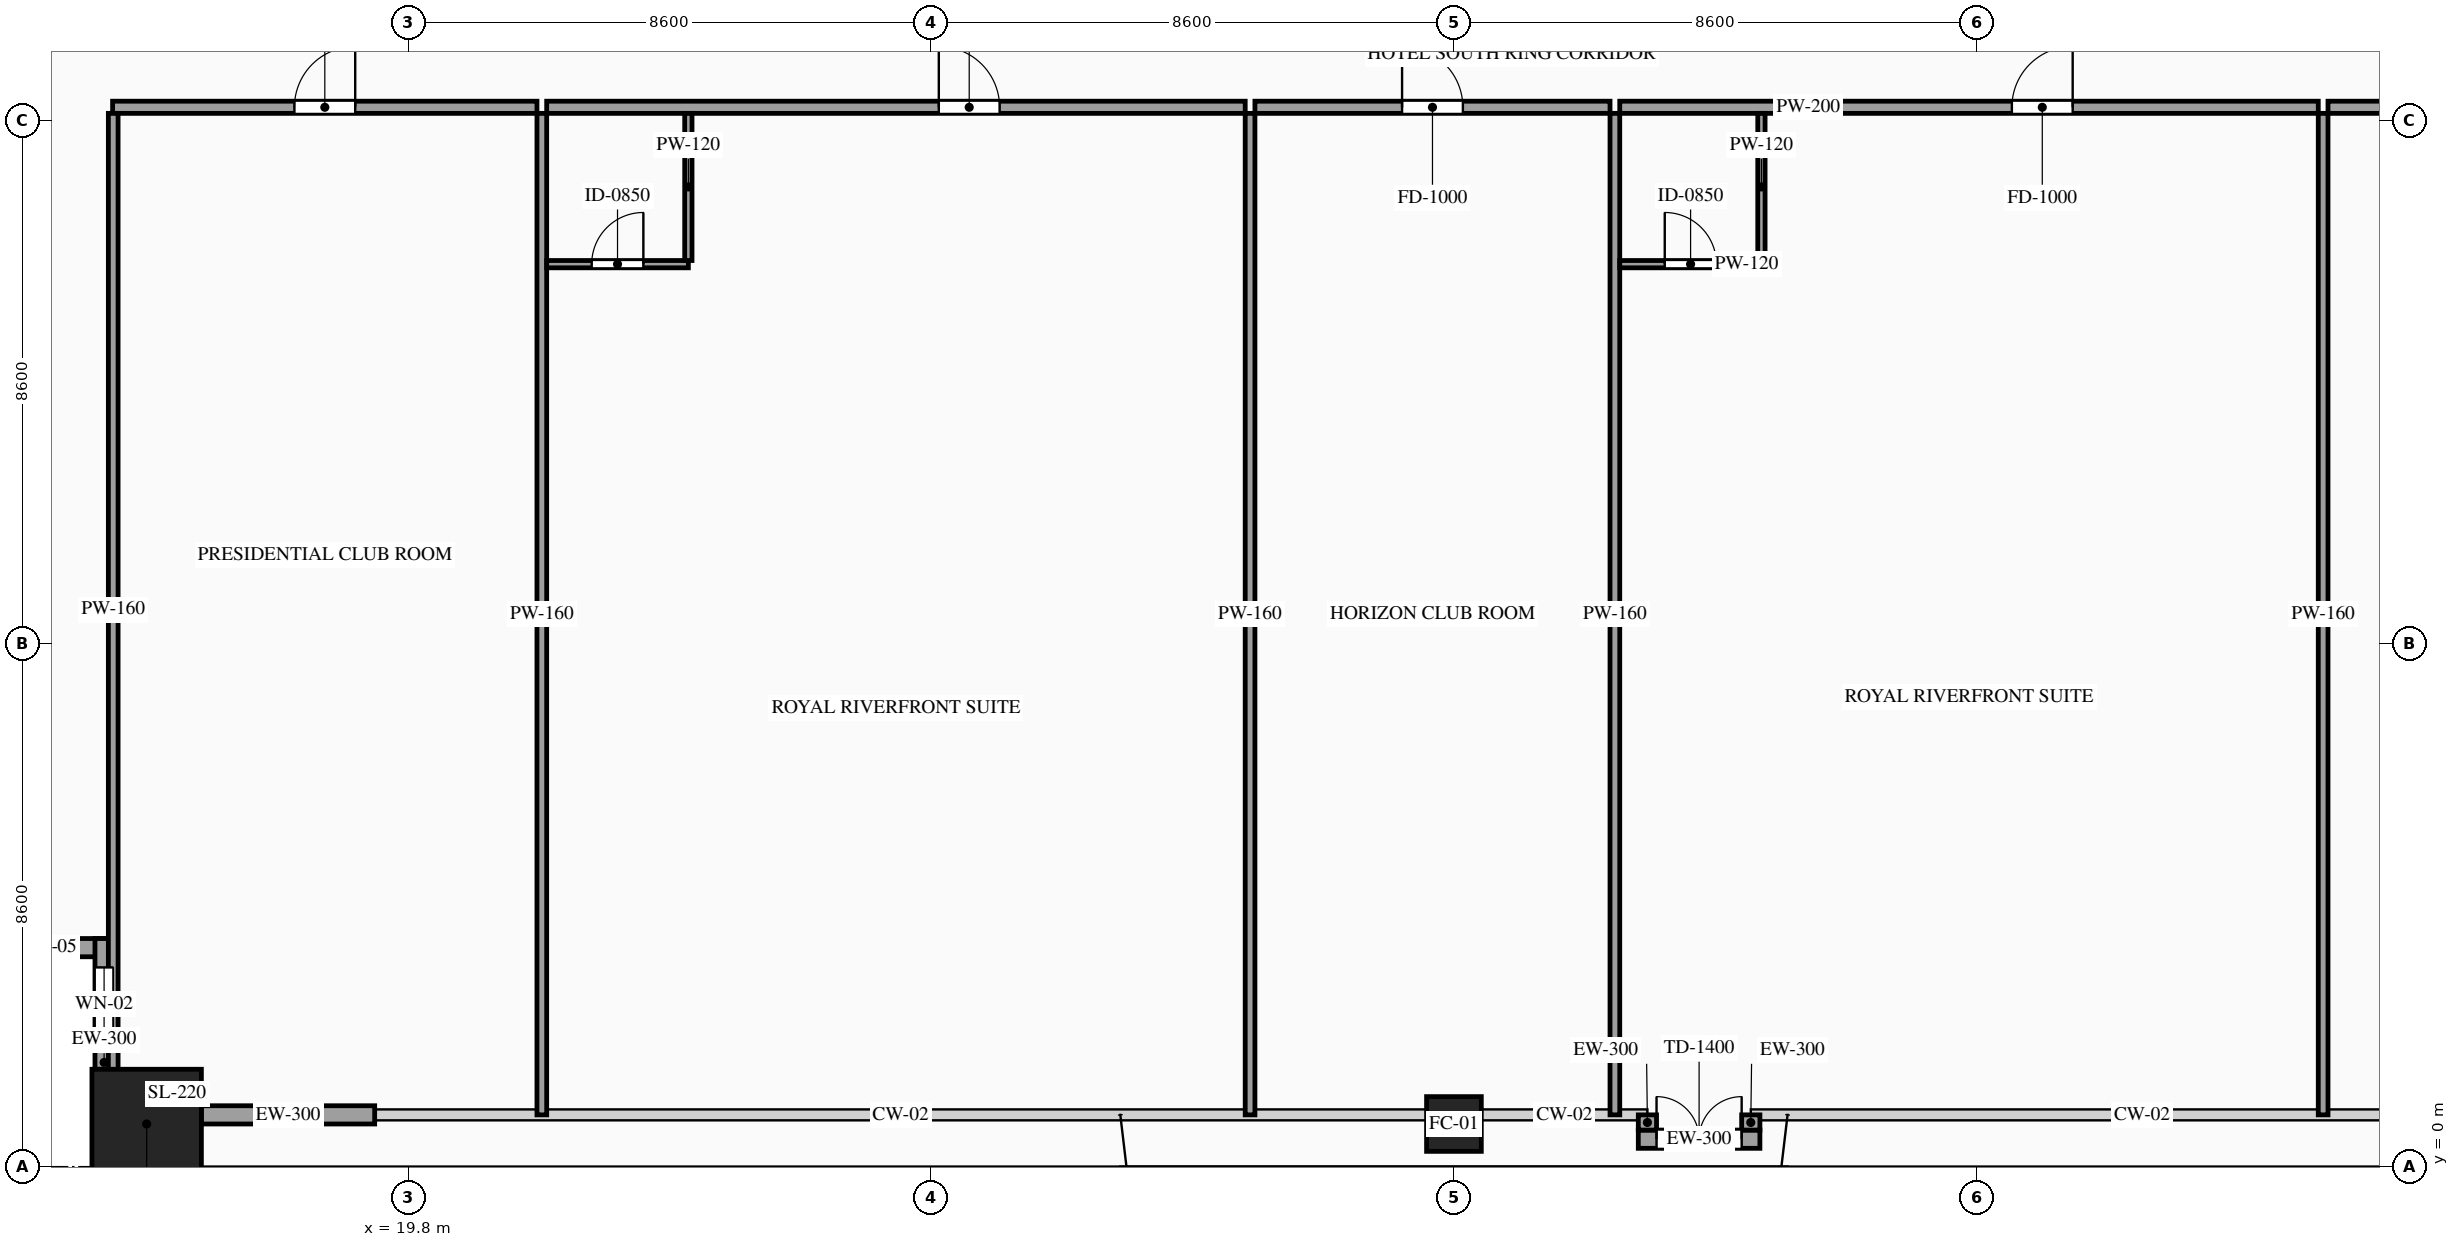
"""IFC4 building model, lengths in metres.
Left out: names, types, materials, properties, quantities, classifications, styles, units other than length and angle.
Written with IfcOpenShell. Run it as: python <this file> out.ifc"""

import sys

from ifc_helpers import new_model, si_unit, direction, frame, frame_2d, origin, origin_2d, place, context, subcontext, project, spatial, rectangle, hollow_rectangle, extrude, source, transform, mapped, element, fill, save


model = new_model("IFC4")
c1 = context("Model", 3, precision=1e-05, world=origin(), true_north=direction((0.0, 1.0)))
c2 = subcontext(c1, "Body", "Model", "MODEL_VIEW")
j1 = project(units=[si_unit("LENGTHUNIT", "METRE"), si_unit("PLANEANGLEUNIT", "RADIAN")], contexts=[c1])
p1 = place(None, origin())
s1 = spatial("IfcSite", under=j1, at=p1, CompositionType="ELEMENT")
p2 = place(p1, origin())
s2 = spatial("IfcBuilding", under=s1, at=p2, CompositionType="ELEMENT")
p3 = place(p2, frame((0.0, 0.0, 78.4)))
s3 = spatial("IfcBuildingStorey", under=s2, at=p3, CompositionType="ELEMENT", Elevation=78.4)
m1 = source(origin(), c2, "Body", "SweptSolid", [
    extrude(hollow_rectangle(XDim=1.8, YDim=1.8, WallThickness=0.08, at=origin_2d()), origin(), (0.0, 0.0, 1.0), 3.6),
])
p4 = place(p3, frame((15.5, 0.7, 0.0), z_axis=(0.0, 0.0, 1.0), x_axis=(1.0, 0.0, 0.0)))
e1 = element("IfcColumn", 1, at=p4, inside=s3, PredefinedType="COLUMN", context=c2, shape_type="MappedRepresentation", body=[
    mapped(m1, transform((0.0, 0.0, 0.0), scale=1.0)),
])
m2 = source(origin(), c2, "Body", "SweptSolid", [
    extrude(hollow_rectangle(XDim=0.9, YDim=0.9, WallThickness=0.042, at=origin_2d()), origin(), (0.0, 0.0, 1.0), 3.6),
])
p5 = place(p3, frame((37.0, 0.7, 0.0), z_axis=(0.0, 0.0, 1.0), x_axis=(1.0, 0.0, 0.0)))
e2 = element("IfcColumn", 2, at=p5, inside=s3, PredefinedType="COLUMN", context=c2, shape_type="MappedRepresentation", body=[
    mapped(m2, transform((0.0, 0.0, 0.0), scale=1.0)),
])
p6 = place(p3, frame((12.8, 3.6, 0.0), z_axis=(0.0, 0.0, 1.0), x_axis=(1.0, 0.0, 0.0)))
e3 = element("IfcWall", 3, at=p6, inside=s3, PredefinedType="SOLIDWALL", context=c2, shape_type="SweptSolid", body=[
    extrude(rectangle(XDim=2.15, YDim=0.3, at=frame_2d((1.075, 0.0))), origin(), (0.0, 0.0, 1.0), 3.38),
])
p7 = place(p6, frame((0.625, 0.0, 0.85)))
e4 = element("IfcOpeningElement", 4, at=p7, cuts=e3, PredefinedType="OPENING", context=c2, shape_type="SweptSolid", body=[
    extrude(rectangle(XDim=0.9, YDim=1.5, at=frame_2d((0.45, 0.75))), frame((0.0, 0.165, 0.0), z_axis=(0.0, -1.0, 0.0), x_axis=(1.0, 0.0, 0.0)), (0.0, 0.0, 1.0), 0.33),
])
p8 = place(p3, frame((14.8, 3.75, 0.0), z_axis=(0.0, 0.0, 1.0), x_axis=(0.0, -1.0, 0.0)))
e5 = element("IfcWall", 5, at=p8, inside=s3, PredefinedType="SOLIDWALL", context=c2, shape_type="SweptSolid", body=[
    extrude(rectangle(XDim=2.15, YDim=0.3, at=frame_2d((1.075, 0.0))), origin(), (0.0, 0.0, 1.0), 3.38),
])
p9 = place(p8, frame((0.475, 0.0, 0.85)))
e6 = element("IfcOpeningElement", 6, at=p9, cuts=e5, PredefinedType="OPENING", context=c2, shape_type="SweptSolid", body=[
    extrude(rectangle(XDim=1.2, YDim=2.1, at=frame_2d((0.6, 1.05))), frame((0.0, 0.165, 0.0), z_axis=(0.0, -1.0, 0.0), x_axis=(1.0, 0.0, 0.0)), (0.0, 0.0, 1.0), 0.33),
])
m3 = source(origin(), c2, "Body", "SweptSolid", [
    extrude(rectangle(XDim=2.85, YDim=0.3, at=frame_2d((1.425, 0.0))), origin(), (0.0, 0.0, 1.0), 2.775),
])
p10 = place(p3, frame((16.4, 0.85, 0.0), z_axis=(0.0, 0.0, 1.0), x_axis=(1.0, 0.0, 0.0)))
e7 = element("IfcWall", 7, at=p10, inside=s3, PredefinedType="SOLIDWALL", context=c2, shape_type="MappedRepresentation", body=[
    mapped(m3, transform((0.0, 0.0, 0.0), scale=1.0)),
])
p11 = place(p3, frame((40.032, 0.45, 0.0), z_axis=(0.0, 0.0, 1.0), x_axis=(1.0, 0.0, 0.0)))
e8 = element("IfcWall", 8, at=p11, inside=s3, PredefinedType="SOLIDWALL", context=c2, shape_type="SweptSolid", body=[
    extrude(rectangle(XDim=2.0, YDim=0.3, at=frame_2d((1.0, 0.0))), origin(), (0.0, 0.0, 1.0), 3.38),
])
p12 = place(p11, frame((0.3, 0.0, 0.0)))
e9 = element("IfcOpeningElement", 9, at=p12, cuts=e8, PredefinedType="OPENING", context=c2, shape_type="SweptSolid", body=[
    extrude(rectangle(XDim=1.4, YDim=2.3, at=frame_2d((0.7, 1.15))), frame((0.0, 0.165, 0.0), z_axis=(0.0, -1.0, 0.0), x_axis=(1.0, 0.0, 0.0)), (0.0, 0.0, 1.0), 0.33),
])
m4 = source(origin(), c2, "Body", "SweptSolid", [
    extrude(rectangle(XDim=0.25, YDim=0.3, at=frame_2d((0.125, 0.0))), origin(), (0.0, 0.0, 1.0), 3.38),
])
for number, where, z_axis, x_axis in (
    (10, (40.182, 0.85, 0.0), (0.0, 0.0, 1.0), (0.0, -1.0, 0.0)),
    (11, (41.882, 0.6, 0.0), (0.0, 0.0, 1.0), (0.0, 1.0, 0.0)),
):
    element("IfcWall", number, at=place(p3, frame(where, z_axis=z_axis, x_axis=x_axis)), inside=s3, PredefinedType="SOLIDWALL", context=c2, shape_type="MappedRepresentation", body=[
        mapped(m4, transform((0.0, 0.0, 0.0), scale=1.0)),
    ])
p13 = place(p3, frame((14.94, 17.42, 0.0), z_axis=(0.0, 0.0, 1.0), x_axis=(1.0, 0.0, 0.0)))
e12 = element("IfcWall", 12, at=p13, inside=s3, PredefinedType="PARTITIONING", context=c2, shape_type="SweptSolid", body=[
    extrude(rectangle(XDim=6.979, YDim=0.2, at=frame_2d((3.49, 0.0))), origin(), (0.0, 0.0, 1.0), 3.38),
])
p14 = place(p13, frame((2.99, 0.0, 0.0)))
e13 = element("IfcOpeningElement", 13, at=p14, cuts=e12, PredefinedType="OPENING", context=c2, shape_type="SweptSolid", body=[
    extrude(rectangle(XDim=1.0, YDim=2.2, at=frame_2d((0.5, 1.1))), frame((0.0, 0.115, 0.0), z_axis=(0.0, -1.0, 0.0), x_axis=(1.0, 0.0, 0.0)), (0.0, 0.0, 1.0), 0.23),
])
m5 = source(origin(), c2, "Body", "SweptSolid", [
    extrude(rectangle(XDim=16.47, YDim=0.16, at=frame_2d((8.235, 0.0))), origin(), (0.0, 0.0, 1.0), 3.38),
])
p15 = place(p3, frame((21.999, 0.85, 0.0), z_axis=(0.0, 0.0, 1.0), x_axis=(0.0, 1.0, 0.0)))
e14 = element("IfcWall", 14, at=p15, inside=s3, PredefinedType="PARTITIONING", context=c2, shape_type="MappedRepresentation", body=[
    mapped(m5, transform((0.0, 0.0, 0.0), scale=1.0)),
])
p16 = place(p3, frame((22.079, 17.42, 0.0), z_axis=(0.0, 0.0, 1.0), x_axis=(1.0, 0.0, 0.0)))
e15 = element("IfcWall", 15, at=p16, inside=s3, PredefinedType="PARTITIONING", context=c2, shape_type="SweptSolid", body=[
    extrude(rectangle(XDim=11.488, YDim=0.2, at=frame_2d((5.744, 0.0))), origin(), (0.0, 0.0, 1.0), 3.38),
])
p17 = place(p16, frame((6.449, 0.0, 0.0)))
e16 = element("IfcOpeningElement", 16, at=p17, cuts=e15, PredefinedType="OPENING", context=c2, shape_type="SweptSolid", body=[
    extrude(rectangle(XDim=1.0, YDim=2.2, at=frame_2d((0.5, 1.1))), frame((0.0, 0.115, 0.0), z_axis=(0.0, -1.0, 0.0), x_axis=(1.0, 0.0, 0.0)), (0.0, 0.0, 1.0), 0.23),
])
p18 = place(p3, frame((33.647, 0.85, 0.0), z_axis=(0.0, 0.0, 1.0), x_axis=(0.0, 1.0, 0.0)))
e17 = element("IfcWall", 17, at=p18, inside=s3, PredefinedType="PARTITIONING", context=c2, shape_type="MappedRepresentation", body=[
    mapped(m5, transform((0.0, 0.0, 0.0), scale=1.0)),
])
p19 = place(p3, frame((22.079, 14.84, 0.0), z_axis=(0.0, 0.0, 1.0), x_axis=(1.0, 0.0, 0.0)))
e18 = element("IfcWall", 18, at=p19, inside=s3, PredefinedType="PARTITIONING", context=c2, shape_type="SweptSolid", body=[
    extrude(rectangle(XDim=2.33, YDim=0.12, at=frame_2d((1.165, 0.0))), origin(), (0.0, 0.0, 1.0), 3.38),
])
p20 = place(p19, frame((0.74, 0.0, 0.0)))
e19 = element("IfcOpeningElement", 19, at=p20, cuts=e18, PredefinedType="OPENING", context=c2, shape_type="SweptSolid", body=[
    extrude(rectangle(XDim=0.85, YDim=2.1, at=frame_2d((0.425, 1.05))), frame((0.0, 0.075, 0.0), z_axis=(0.0, -1.0, 0.0), x_axis=(1.0, 0.0, 0.0)), (0.0, 0.0, 1.0), 0.15),
])
m6 = source(origin(), c2, "Body", "SweptSolid", [
    extrude(rectangle(XDim=2.42, YDim=0.12, at=frame_2d((1.21, 0.0))), origin(), (0.0, 0.0, 1.0), 3.38),
])
p21 = place(p3, frame((24.409, 14.9, 0.0), z_axis=(0.0, 0.0, 1.0), x_axis=(0.0, 1.0, 0.0)))
e20 = element("IfcWall", 20, at=p21, inside=s3, PredefinedType="PARTITIONING", context=c2, shape_type="MappedRepresentation", body=[
    mapped(m6, transform((0.0, 0.0, 0.0), scale=1.0)),
])
p22 = place(p3, frame((33.727, 17.42, 0.0), z_axis=(0.0, 0.0, 1.0), x_axis=(1.0, 0.0, 0.0)))
e21 = element("IfcWall", 21, at=p22, inside=s3, PredefinedType="PARTITIONING", context=c2, shape_type="SweptSolid", body=[
    extrude(rectangle(XDim=5.84, YDim=0.2, at=frame_2d((2.92, 0.0))), origin(), (0.0, 0.0, 1.0), 3.38),
])
p23 = place(p22, frame((2.42, 0.0, 0.0)))
e22 = element("IfcOpeningElement", 22, at=p23, cuts=e21, PredefinedType="OPENING", context=c2, shape_type="SweptSolid", body=[
    extrude(rectangle(XDim=1.0, YDim=2.2, at=frame_2d((0.5, 1.1))), frame((0.0, 0.115, 0.0), z_axis=(0.0, -1.0, 0.0), x_axis=(1.0, 0.0, 0.0)), (0.0, 0.0, 1.0), 0.23),
])
p24 = place(p3, frame((39.647, 0.85, 0.0), z_axis=(0.0, 0.0, 1.0), x_axis=(0.0, 1.0, 0.0)))
e23 = element("IfcWall", 23, at=p24, inside=s3, PredefinedType="PARTITIONING", context=c2, shape_type="MappedRepresentation", body=[
    mapped(m5, transform((0.0, 0.0, 0.0), scale=1.0)),
])
p25 = place(p3, frame((39.727, 17.42, 0.0), z_axis=(0.0, 0.0, 1.0), x_axis=(1.0, 0.0, 0.0)))
e24 = element("IfcWall", 24, at=p25, inside=s3, PredefinedType="PARTITIONING", context=c2, shape_type="SweptSolid", body=[
    extrude(rectangle(XDim=11.488, YDim=0.2, at=frame_2d((5.744, 0.0))), origin(), (0.0, 0.0, 1.0), 3.38),
])
p26 = place(p25, frame((6.449, 0.0, 0.0)))
e25 = element("IfcOpeningElement", 25, at=p26, cuts=e24, PredefinedType="OPENING", context=c2, shape_type="SweptSolid", body=[
    extrude(rectangle(XDim=1.0, YDim=2.2, at=frame_2d((0.5, 1.1))), frame((0.0, 0.115, 0.0), z_axis=(0.0, -1.0, 0.0), x_axis=(1.0, 0.0, 0.0)), (0.0, 0.0, 1.0), 0.23),
])
p27 = place(p3, frame((51.295, 0.85, 0.0), z_axis=(0.0, 0.0, 1.0), x_axis=(0.0, 1.0, 0.0)))
e26 = element("IfcWall", 26, at=p27, inside=s3, PredefinedType="PARTITIONING", context=c2, shape_type="MappedRepresentation", body=[
    mapped(m5, transform((0.0, 0.0, 0.0), scale=1.0)),
])
p28 = place(p3, frame((39.727, 14.84, 0.0), z_axis=(0.0, 0.0, 1.0), x_axis=(1.0, 0.0, 0.0)))
e27 = element("IfcWall", 27, at=p28, inside=s3, PredefinedType="PARTITIONING", context=c2, shape_type="SweptSolid", body=[
    extrude(rectangle(XDim=2.33, YDim=0.12, at=frame_2d((1.165, 0.0))), origin(), (0.0, 0.0, 1.0), 3.38),
])
p29 = place(p28, frame((0.74, 0.0, 0.0)))
e28 = element("IfcOpeningElement", 28, at=p29, cuts=e27, PredefinedType="OPENING", context=c2, shape_type="SweptSolid", body=[
    extrude(rectangle(XDim=0.85, YDim=2.1, at=frame_2d((0.425, 1.05))), frame((0.0, 0.075, 0.0), z_axis=(0.0, -1.0, 0.0), x_axis=(1.0, 0.0, 0.0)), (0.0, 0.0, 1.0), 0.15),
])
p30 = place(p3, frame((42.057, 14.9, 0.0), z_axis=(0.0, 0.0, 1.0), x_axis=(0.0, 1.0, 0.0)))
e29 = element("IfcWall", 29, at=p30, inside=s3, PredefinedType="PARTITIONING", context=c2, shape_type="MappedRepresentation", body=[
    mapped(m6, transform((0.0, 0.0, 0.0), scale=1.0)),
])
p31 = place(p3, frame((51.375, 17.42, 0.0), z_axis=(0.0, 0.0, 1.0), x_axis=(1.0, 0.0, 0.0)))
e30 = element("IfcWall", 30, at=p31, inside=s3, PredefinedType="PARTITIONING", context=c2, shape_type="SweptSolid", body=[
    extrude(rectangle(XDim=7.685, YDim=0.2, at=frame_2d((3.843, 0.0))), origin(), (0.0, 0.0, 1.0), 3.38),
])
p32 = place(p31, frame((3.343, 0.0, 0.0)))
e31 = element("IfcOpeningElement", 31, at=p32, cuts=e30, PredefinedType="OPENING", context=c2, shape_type="SweptSolid", body=[
    extrude(rectangle(XDim=1.0, YDim=2.2, at=frame_2d((0.5, 1.1))), frame((0.0, 0.115, 0.0), z_axis=(0.0, -1.0, 0.0), x_axis=(1.0, 0.0, 0.0)), (0.0, 0.0, 1.0), 0.23),
])
m7 = source(origin(), c2, "Body", "SweptSolid", [
    extrude(rectangle(XDim=16.32, YDim=0.16, at=frame_2d((8.16, 0.0))), origin(), (0.0, 0.0, 1.0), 3.38),
])
p33 = place(p3, frame((14.95, 1.0, 0.0), z_axis=(0.0, 0.0, 1.0), x_axis=(0.0, 1.0, 0.0)))
e32 = element("IfcWall", 32, at=p33, inside=s3, PredefinedType="PARTITIONING", context=c2, shape_type="MappedRepresentation", body=[
    mapped(m7, transform((0.0, 0.0, 0.0), scale=1.0)),
])
m8 = source(origin(), c2, "Body", "SweptSolid", [
    extrude(rectangle(XDim=0.9, YDim=1.5, at=frame_2d((0.45, 0.75))), frame((0.0, 0.03, 0.0), z_axis=(0.0, -1.0, 0.0), x_axis=(1.0, 0.0, 0.0)), (0.0, 0.0, 1.0), 0.06),
])
p34 = place(p7, origin())
e33 = element("IfcWindow", 33, at=p34, inside=s3, PartitioningType="SINGLE_PANEL", PredefinedType="WINDOW", context=c2, shape_type="MappedRepresentation", body=[
    mapped(m8, transform((0.0, 0.0, 0.0), scale=1.0)),
])
fill(e4, e33)
m9 = source(origin(), c2, "Body", "SweptSolid", [
    extrude(rectangle(XDim=1.2, YDim=2.1, at=frame_2d((0.6, 1.05))), frame((0.0, 0.03, 0.0), z_axis=(0.0, -1.0, 0.0), x_axis=(1.0, 0.0, 0.0)), (0.0, 0.0, 1.0), 0.06),
])
p35 = place(p9, origin())
e34 = element("IfcWindow", 34, at=p35, inside=s3, PartitioningType="SINGLE_PANEL", PredefinedType="WINDOW", context=c2, shape_type="MappedRepresentation", body=[
    mapped(m9, transform((0.0, 0.0, 0.0), scale=1.0)),
])
fill(e6, e34)
m10 = source(origin(), c2, "Body", "SweptSolid", [
    extrude(rectangle(XDim=1.4, YDim=2.3, at=frame_2d((0.7, 1.15))), frame((0.0, 0.025, 0.0), z_axis=(0.0, -1.0, 0.0), x_axis=(1.0, 0.0, 0.0)), (0.0, 0.0, 1.0), 0.05),
])
p36 = place(p12, origin())
e35 = element("IfcDoor", 35, at=p36, inside=s3, OperationType="DOUBLE_DOOR_SINGLE_SWING", PredefinedType="DOOR", context=c2, shape_type="MappedRepresentation", body=[
    mapped(m10, transform((0.0, 0.0, 0.0), scale=1.0)),
])
fill(e9, e35)
m11 = source(origin(), c2, "Body", "SweptSolid", [
    extrude(rectangle(XDim=1.0, YDim=2.2, at=frame_2d((0.5, 1.1))), frame((0.0, 0.025, 0.0), z_axis=(0.0, -1.0, 0.0), x_axis=(1.0, 0.0, 0.0)), (0.0, 0.0, 1.0), 0.05),
])
p37 = place(p14, origin())
e36 = element("IfcDoor", 36, at=p37, inside=s3, OperationType="SINGLE_SWING_RIGHT", PredefinedType="DOOR", context=c2, shape_type="MappedRepresentation", body=[
    mapped(m11, transform((0.0, 0.0, 0.0), scale=1.0)),
])
fill(e13, e36)
p38 = place(p17, origin())
e37 = element("IfcDoor", 37, at=p38, inside=s3, OperationType="SINGLE_SWING_LEFT", PredefinedType="DOOR", context=c2, shape_type="MappedRepresentation", body=[
    mapped(m11, transform((0.0, 0.0, 0.0), scale=1.0)),
])
fill(e16, e37)
m12 = source(origin(), c2, "Body", "SweptSolid", [
    extrude(rectangle(XDim=0.85, YDim=2.1, at=frame_2d((0.425, 1.05))), frame((0.0, 0.025, 0.0), z_axis=(0.0, -1.0, 0.0), x_axis=(1.0, 0.0, 0.0)), (0.0, 0.0, 1.0), 0.05),
])
p39 = place(p20, origin())
e38 = element("IfcDoor", 38, at=p39, inside=s3, OperationType="SINGLE_SWING_RIGHT", PredefinedType="DOOR", context=c2, shape_type="MappedRepresentation", body=[
    mapped(m12, transform((0.0, 0.0, 0.0), scale=1.0)),
])
fill(e19, e38)
p40 = place(p23, origin())
e39 = element("IfcDoor", 39, at=p40, inside=s3, OperationType="SINGLE_SWING_LEFT", PredefinedType="DOOR", context=c2, shape_type="MappedRepresentation", body=[
    mapped(m11, transform((0.0, 0.0, 0.0), scale=1.0)),
])
fill(e22, e39)
p41 = place(p26, origin())
e40 = element("IfcDoor", 40, at=p41, inside=s3, OperationType="SINGLE_SWING_RIGHT", PredefinedType="DOOR", context=c2, shape_type="MappedRepresentation", body=[
    mapped(m11, transform((0.0, 0.0, 0.0), scale=1.0)),
])
fill(e25, e40)
p42 = place(p29, origin())
e41 = element("IfcDoor", 41, at=p42, inside=s3, OperationType="SINGLE_SWING_LEFT", PredefinedType="DOOR", context=c2, shape_type="MappedRepresentation", body=[
    mapped(m12, transform((0.0, 0.0, 0.0), scale=1.0)),
])
fill(e28, e41)
save(model, sys.argv[1])
